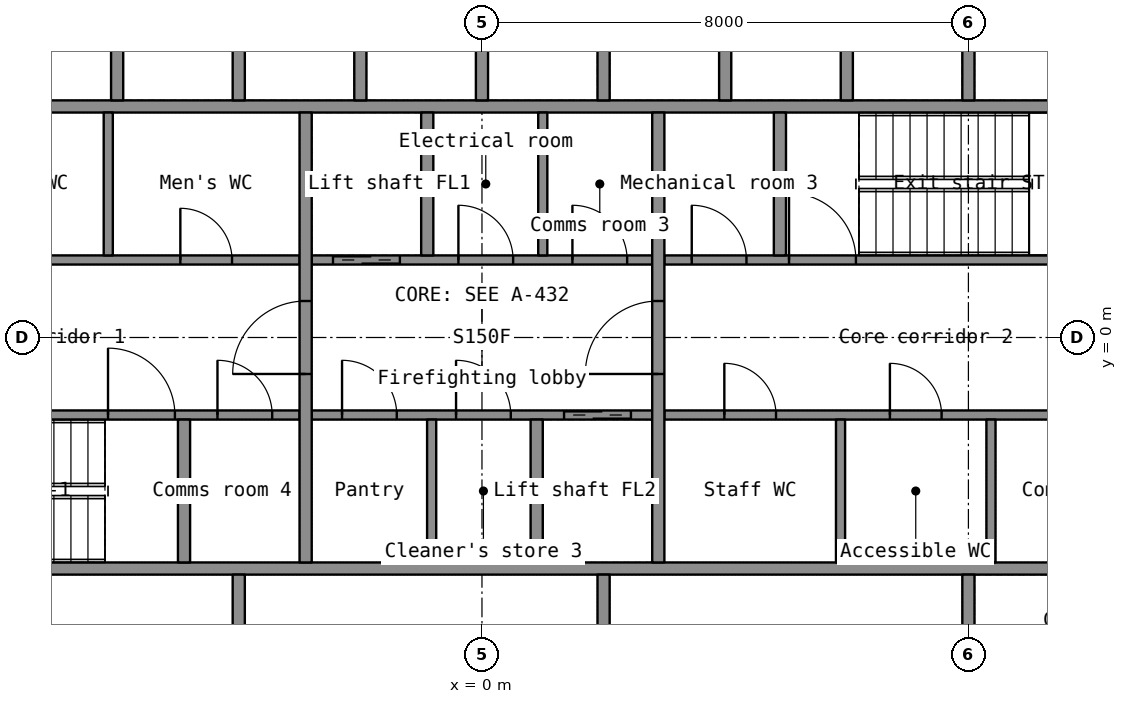
"""IFC4 building model, lengths in metres.
Left out: names, types, materials, properties, quantities, classifications, styles, units other than length and angle.
Written with IfcOpenShell. Run it as: python <this file> out.ifc"""

import sys

from ifc_helpers import new_model, si_unit, direction, frame, frame_2d, origin, place, context, subcontext, project, spatial, rectangle, extrude, element, fill, save


model = new_model("IFC4")
c1 = context("Model", 3, precision=1e-05, world=origin(), true_north=direction((0.0, 1.0)))
c2 = subcontext(c1, "Body", "Model", "MODEL_VIEW")
j1 = project(units=[si_unit("LENGTHUNIT", "METRE"), si_unit("PLANEANGLEUNIT", "RADIAN")], contexts=[c1])
p1 = place(None, origin())
s1 = spatial("IfcSite", under=j1, at=p1, CompositionType="ELEMENT")
p2 = place(p1, origin())
s2 = spatial("IfcBuilding", under=s1, at=p2, CompositionType="ELEMENT")
p3 = place(p2, frame((0.0, 0.0, 250.4)))
s3 = spatial("IfcBuildingStorey", under=s2, at=p3, CompositionType="ELEMENT", Elevation=250.4)
for number, where, z_axis, x_axis in (
    (1, (-11.6, -3.8, 0.0), (0.0, 0.0, 1.0), (1.0, 0.0, 0.0)),
    (2, (-11.6, 3.8, 0.0), (0.0, 0.0, 1.0), (1.0, 0.0, 0.0)),
):
    element("IfcWall", number, at=place(p3, frame(where, z_axis=z_axis, x_axis=x_axis)), inside=s3, PredefinedType="SHEAR", context=c2, shape_type="SweptSolid", body=[
        extrude(rectangle(XDim=23.2, YDim=0.2, at=frame_2d((11.6, 0.0))), origin(), (0.0, 0.0, 1.0), 3.3),
    ])
p4 = place(p3, frame((8.0, -6.8, 0.0), z_axis=(0.0, 0.0, 1.0), x_axis=(0.0, 1.0, 0.0)))
e3 = element("IfcWall", 3, at=p4, inside=s3, PredefinedType="SHEAR", context=c2, shape_type="SweptSolid", body=[
    extrude(rectangle(XDim=2.9, YDim=0.2, at=frame_2d((1.45, 0.0))), origin(), (0.0, 0.0, 1.0), 3.3),
])
for number, where, z_axis, x_axis in (
    (4, (-4.0, -6.8, 0.0), (0.0, 0.0, 1.0), (0.0, 1.0, 0.0)),
    (5, (2.0, -6.8, 0.0), (0.0, 0.0, 1.0), (0.0, 1.0, 0.0)),
):
    element("IfcWall", number, at=place(p3, frame(where, z_axis=z_axis, x_axis=x_axis)), inside=s3, PredefinedType="PARTITIONING", context=c2, shape_type="SweptSolid", body=[
        extrude(rectangle(XDim=2.9, YDim=0.2, at=frame_2d((1.45, 0.0))), origin(), (0.0, 0.0, 1.0), 3.3),
    ])
for number, where, z_axis, x_axis in (
    (6, (-6.0, 3.9, 0.0), (0.0, 0.0, 1.0), (0.0, 1.0, 0.0)),
    (7, (-4.0, 3.9, 0.0), (0.0, 0.0, 1.0), (0.0, 1.0, 0.0)),
    (8, (-2.0, 3.9, 0.0), (0.0, 0.0, 1.0), (0.0, 1.0, 0.0)),
    (9, (0.0, 3.9, 0.0), (0.0, 0.0, 1.0), (0.0, 1.0, 0.0)),
    (10, (2.0, 3.9, 0.0), (0.0, 0.0, 1.0), (0.0, 1.0, 0.0)),
    (11, (4.0, 3.9, 0.0), (0.0, 0.0, 1.0), (0.0, 1.0, 0.0)),
    (12, (6.0, 3.9, 0.0), (0.0, 0.0, 1.0), (0.0, 1.0, 0.0)),
    (13, (8.0, 3.9, 0.0), (0.0, 0.0, 1.0), (0.0, 1.0, 0.0)),
):
    element("IfcWall", number, at=place(p3, frame(where, z_axis=z_axis, x_axis=x_axis)), inside=s3, PredefinedType="SHEAR", context=c2, shape_type="SweptSolid", body=[
        extrude(rectangle(XDim=2.9, YDim=0.2, at=frame_2d((1.45, 0.0))), origin(), (0.0, 0.0, 1.0), 3.3),
    ])
p5 = place(p3, frame((-11.6, -1.275, 0.0), z_axis=(0.0, 0.0, 1.0), x_axis=(1.0, 0.0, 0.0)))
e14 = element("IfcWall", 14, at=p5, inside=s3, PredefinedType="SHEAR", context=c2, shape_type="SweptSolid", body=[
    extrude(rectangle(XDim=8.6, YDim=0.15, at=frame_2d((4.3, 0.0))), origin(), (0.0, 0.0, 1.0), 3.3),
])
p6 = place(p5, frame((5.45, 0.0, 0.0)))
e15 = element("IfcOpeningElement", 15, at=p6, cuts=e14, PredefinedType="OPENING", context=c2, shape_type="SweptSolid", body=[
    extrude(rectangle(XDim=1.1, YDim=2.15, at=frame_2d((0.55, 1.075))), frame((0.0, 0.085, 0.0), z_axis=(0.0, -1.0, 0.0), x_axis=(1.0, 0.0, 0.0)), (0.0, 0.0, 1.0), 0.17),
])
p7 = place(p5, frame((7.25, 0.0, 0.0)))
e16 = element("IfcOpeningElement", 16, at=p7, cuts=e14, PredefinedType="OPENING", context=c2, shape_type="SweptSolid", body=[
    extrude(rectangle(XDim=0.9, YDim=2.1, at=frame_2d((0.45, 1.05))), frame((0.0, 0.085, 0.0), z_axis=(0.0, -1.0, 0.0), x_axis=(1.0, 0.0, 0.0)), (0.0, 0.0, 1.0), 0.17),
])
p8 = place(p3, frame((-2.8, -1.275, 0.0), z_axis=(0.0, 0.0, 1.0), x_axis=(1.0, 0.0, 0.0)))
e17 = element("IfcWall", 17, at=p8, inside=s3, PredefinedType="SHEAR", context=c2, shape_type="SweptSolid", body=[
    extrude(rectangle(XDim=5.6, YDim=0.15, at=frame_2d((2.8, 0.0))), origin(), (0.0, 0.0, 1.0), 3.3),
])
p9 = place(p8, frame((4.15, 0.0, 0.0)))
e18 = element("IfcOpeningElement", 18, at=p9, cuts=e17, PredefinedType="OPENING", context=c2, shape_type="SweptSolid", body=[
    extrude(rectangle(XDim=1.1, YDim=2.2, at=frame_2d((0.55, 1.1))), frame((0.0, 0.085, 0.0), z_axis=(0.0, -1.0, 0.0), x_axis=(1.0, 0.0, 0.0)), (0.0, 0.0, 1.0), 0.17),
])
p10 = place(p8, frame((0.499, 0.0, 0.0)))
e19 = element("IfcOpeningElement", 19, at=p10, cuts=e17, PredefinedType="OPENING", context=c2, shape_type="SweptSolid", body=[
    extrude(rectangle(XDim=0.9, YDim=2.1, at=frame_2d((0.45, 1.05))), frame((0.0, 0.085, 0.0), z_axis=(0.0, -1.0, 0.0), x_axis=(1.0, 0.0, 0.0)), (0.0, 0.0, 1.0), 0.17),
])
p11 = place(p8, frame((2.374, 0.0, 0.0)))
e20 = element("IfcOpeningElement", 20, at=p11, cuts=e17, PredefinedType="OPENING", context=c2, shape_type="SweptSolid", body=[
    extrude(rectangle(XDim=0.9, YDim=2.1, at=frame_2d((0.45, 1.05))), frame((0.0, 0.085, 0.0), z_axis=(0.0, -1.0, 0.0), x_axis=(1.0, 0.0, 0.0)), (0.0, 0.0, 1.0), 0.17),
])
p12 = place(p3, frame((3.0, -1.275, 0.0), z_axis=(0.0, 0.0, 1.0), x_axis=(1.0, 0.0, 0.0)))
e21 = element("IfcWall", 21, at=p12, inside=s3, PredefinedType="PARTITIONING", context=c2, shape_type="SweptSolid", body=[
    extrude(rectangle(XDim=8.6, YDim=0.15, at=frame_2d((4.3, 0.0))), origin(), (0.0, 0.0, 1.0), 3.3),
])
p13 = place(p12, frame((0.986, 0.0, 0.0)))
e22 = element("IfcOpeningElement", 22, at=p13, cuts=e21, PredefinedType="OPENING", context=c2, shape_type="SweptSolid", body=[
    extrude(rectangle(XDim=0.85, YDim=2.1, at=frame_2d((0.425, 1.05))), frame((0.0, 0.085, 0.0), z_axis=(0.0, -1.0, 0.0), x_axis=(1.0, 0.0, 0.0)), (0.0, 0.0, 1.0), 0.17),
])
p14 = place(p12, frame((3.709, 0.0, 0.0)))
e23 = element("IfcOpeningElement", 23, at=p14, cuts=e21, PredefinedType="OPENING", context=c2, shape_type="SweptSolid", body=[
    extrude(rectangle(XDim=0.85, YDim=2.1, at=frame_2d((0.425, 1.05))), frame((0.0, 0.085, 0.0), z_axis=(0.0, -1.0, 0.0), x_axis=(1.0, 0.0, 0.0)), (0.0, 0.0, 1.0), 0.17),
])
p15 = place(p12, frame((6.573, 0.0, 0.0)))
e24 = element("IfcOpeningElement", 24, at=p15, cuts=e21, PredefinedType="OPENING", context=c2, shape_type="SweptSolid", body=[
    extrude(rectangle(XDim=0.9, YDim=2.1, at=frame_2d((0.45, 1.05))), frame((0.0, 0.085, 0.0), z_axis=(0.0, -1.0, 0.0), x_axis=(1.0, 0.0, 0.0)), (0.0, 0.0, 1.0), 0.17),
])
p16 = place(p3, frame((-11.6, 1.275, 0.0), z_axis=(0.0, 0.0, 1.0), x_axis=(1.0, 0.0, 0.0)))
e25 = element("IfcWall", 25, at=p16, inside=s3, PredefinedType="PARTITIONING", context=c2, shape_type="SweptSolid", body=[
    extrude(rectangle(XDim=8.6, YDim=0.15, at=frame_2d((4.3, 0.0))), origin(), (0.0, 0.0, 1.0), 3.3),
])
p17 = place(p16, frame((0.629, 0.0, 0.0)))
e26 = element("IfcOpeningElement", 26, at=p17, cuts=e25, PredefinedType="OPENING", context=c2, shape_type="SweptSolid", body=[
    extrude(rectangle(XDim=0.9, YDim=2.1, at=frame_2d((0.45, 1.05))), frame((0.0, 0.085, 0.0), z_axis=(0.0, -1.0, 0.0), x_axis=(1.0, 0.0, 0.0)), (0.0, 0.0, 1.0), 0.17),
])
p18 = place(p16, frame((3.418, 0.0, 0.0)))
e27 = element("IfcOpeningElement", 27, at=p18, cuts=e25, PredefinedType="OPENING", context=c2, shape_type="SweptSolid", body=[
    extrude(rectangle(XDim=0.85, YDim=2.1, at=frame_2d((0.425, 1.05))), frame((0.0, 0.085, 0.0), z_axis=(0.0, -1.0, 0.0), x_axis=(1.0, 0.0, 0.0)), (0.0, 0.0, 1.0), 0.17),
])
p19 = place(p16, frame((6.639, 0.0, 0.0)))
e28 = element("IfcOpeningElement", 28, at=p19, cuts=e25, PredefinedType="OPENING", context=c2, shape_type="SweptSolid", body=[
    extrude(rectangle(XDim=0.85, YDim=2.1, at=frame_2d((0.425, 1.05))), frame((0.0, 0.085, 0.0), z_axis=(0.0, -1.0, 0.0), x_axis=(1.0, 0.0, 0.0)), (0.0, 0.0, 1.0), 0.17),
])
p20 = place(p3, frame((-2.8, 1.275, 0.0), z_axis=(0.0, 0.0, 1.0), x_axis=(1.0, 0.0, 0.0)))
e29 = element("IfcWall", 29, at=p20, inside=s3, PredefinedType="SHEAR", context=c2, shape_type="SweptSolid", body=[
    extrude(rectangle(XDim=5.6, YDim=0.15, at=frame_2d((2.8, 0.0))), origin(), (0.0, 0.0, 1.0), 3.3),
])
p21 = place(p20, frame((0.35, 0.0, 0.0)))
e30 = element("IfcOpeningElement", 30, at=p21, cuts=e29, PredefinedType="OPENING", context=c2, shape_type="SweptSolid", body=[
    extrude(rectangle(XDim=1.1, YDim=2.2, at=frame_2d((0.55, 1.1))), frame((0.0, 0.085, 0.0), z_axis=(0.0, -1.0, 0.0), x_axis=(1.0, 0.0, 0.0)), (0.0, 0.0, 1.0), 0.17),
])
p22 = place(p20, frame((2.413, 0.0, 0.0)))
e31 = element("IfcOpeningElement", 31, at=p22, cuts=e29, PredefinedType="OPENING", context=c2, shape_type="SweptSolid", body=[
    extrude(rectangle(XDim=0.9, YDim=2.1, at=frame_2d((0.45, 1.05))), frame((0.0, 0.085, 0.0), z_axis=(0.0, -1.0, 0.0), x_axis=(1.0, 0.0, 0.0)), (0.0, 0.0, 1.0), 0.17),
])
p23 = place(p20, frame((4.288, 0.0, 0.0)))
e32 = element("IfcOpeningElement", 32, at=p23, cuts=e29, PredefinedType="OPENING", context=c2, shape_type="SweptSolid", body=[
    extrude(rectangle(XDim=0.9, YDim=2.1, at=frame_2d((0.45, 1.05))), frame((0.0, 0.085, 0.0), z_axis=(0.0, -1.0, 0.0), x_axis=(1.0, 0.0, 0.0)), (0.0, 0.0, 1.0), 0.17),
])
p24 = place(p3, frame((3.0, 1.275, 0.0), z_axis=(0.0, 0.0, 1.0), x_axis=(1.0, 0.0, 0.0)))
e33 = element("IfcWall", 33, at=p24, inside=s3, PredefinedType="SHEAR", context=c2, shape_type="SweptSolid", body=[
    extrude(rectangle(XDim=8.6, YDim=0.15, at=frame_2d((4.3, 0.0))), origin(), (0.0, 0.0, 1.0), 3.3),
])
p25 = place(p24, frame((2.05, 0.0, 0.0)))
e34 = element("IfcOpeningElement", 34, at=p25, cuts=e33, PredefinedType="OPENING", context=c2, shape_type="SweptSolid", body=[
    extrude(rectangle(XDim=1.1, YDim=2.15, at=frame_2d((0.55, 1.075))), frame((0.0, 0.085, 0.0), z_axis=(0.0, -1.0, 0.0), x_axis=(1.0, 0.0, 0.0)), (0.0, 0.0, 1.0), 0.17),
])
p26 = place(p24, frame((0.45, 0.0, 0.0)))
e35 = element("IfcOpeningElement", 35, at=p26, cuts=e33, PredefinedType="OPENING", context=c2, shape_type="SweptSolid", body=[
    extrude(rectangle(XDim=0.9, YDim=2.1, at=frame_2d((0.45, 1.05))), frame((0.0, 0.085, 0.0), z_axis=(0.0, -1.0, 0.0), x_axis=(1.0, 0.0, 0.0)), (0.0, 0.0, 1.0), 0.17),
])
p27 = place(p3, frame((-2.9, -3.7, 0.0), z_axis=(0.0, 0.0, 1.0), x_axis=(0.0, 1.0, 0.0)))
e36 = element("IfcWall", 36, at=p27, inside=s3, PredefinedType="SHEAR", context=c2, shape_type="SweptSolid", body=[
    extrude(rectangle(XDim=7.4, YDim=0.2, at=frame_2d((3.7, 0.0))), origin(), (0.0, 0.0, 1.0), 3.3),
])
p28 = place(p27, frame((3.1, 0.0, 0.0)))
e37 = element("IfcOpeningElement", 37, at=p28, cuts=e36, PredefinedType="OPENING", context=c2, shape_type="SweptSolid", body=[
    extrude(rectangle(XDim=1.2, YDim=2.2, at=frame_2d((0.6, 1.1))), frame((0.0, 0.11, 0.0), z_axis=(0.0, -1.0, 0.0), x_axis=(1.0, 0.0, 0.0)), (0.0, 0.0, 1.0), 0.22),
])
p29 = place(p3, frame((2.9, -3.7, 0.0), z_axis=(0.0, 0.0, 1.0), x_axis=(0.0, 1.0, 0.0)))
e38 = element("IfcWall", 38, at=p29, inside=s3, PredefinedType="SHEAR", context=c2, shape_type="SweptSolid", body=[
    extrude(rectangle(XDim=7.4, YDim=0.2, at=frame_2d((3.7, 0.0))), origin(), (0.0, 0.0, 1.0), 3.3),
])
p30 = place(p29, frame((3.1, 0.0, 0.0)))
e39 = element("IfcOpeningElement", 39, at=p30, cuts=e38, PredefinedType="OPENING", context=c2, shape_type="SweptSolid", body=[
    extrude(rectangle(XDim=1.2, YDim=2.2, at=frame_2d((0.6, 1.1))), frame((0.0, 0.11, 0.0), z_axis=(0.0, -1.0, 0.0), x_axis=(1.0, 0.0, 0.0)), (0.0, 0.0, 1.0), 0.22),
])
for number, where, z_axis, x_axis in (
    (40, (-0.9, 1.35, 0.0), (0.0, 0.0, 1.0), (0.0, 1.0, 0.0)),
    (41, (0.9, -3.7, 0.0), (0.0, 0.0, 1.0), (0.0, 1.0, 0.0)),
    (42, (-4.9, -3.7, 0.0), (0.0, 0.0, 1.0), (0.0, 1.0, 0.0)),
    (43, (4.9, 1.35, 0.0), (0.0, 0.0, 1.0), (0.0, 1.0, 0.0)),
):
    element("IfcWall", number, at=place(p3, frame(where, z_axis=z_axis, x_axis=x_axis)), inside=s3, PredefinedType="SHEAR", context=c2, shape_type="SweptSolid", body=[
        extrude(rectangle(XDim=2.35, YDim=0.2, at=frame_2d((1.175, 0.0))), origin(), (0.0, 0.0, 1.0), 3.3),
    ])
for number, where, z_axis, x_axis in (
    (44, (-6.146, 1.35, 0.0), (0.0, 0.0, 1.0), (0.0, 1.0, 0.0)),
    (45, (5.897, -3.7, 0.0), (0.0, 0.0, 1.0), (0.0, 1.0, 0.0)),
    (46, (8.371, -3.7, 0.0), (0.0, 0.0, 1.0), (0.0, 1.0, 0.0)),
    (47, (1.0, 1.35, 0.0), (0.0, 0.0, 1.0), (0.0, 1.0, 0.0)),
    (48, (-0.827, -3.7, 0.0), (0.0, 0.0, 1.0), (0.0, 1.0, 0.0)),
):
    element("IfcWall", number, at=place(p3, frame(where, z_axis=z_axis, x_axis=x_axis)), inside=s3, PredefinedType="PARTITIONING", context=c2, shape_type="SweptSolid", body=[
        extrude(rectangle(XDim=2.35, YDim=0.15, at=frame_2d((1.175, 0.0))), origin(), (0.0, 0.0, 1.0), 3.3),
    ])
p31 = place(p28, origin())
e49 = element("IfcDoor", 49, at=p31, inside=s3, OperationType="SINGLE_SWING_LEFT", PredefinedType="DOOR", context=c2, shape_type="SweptSolid", body=[
    extrude(rectangle(XDim=1.2, YDim=2.2, at=frame_2d((0.6, 1.1))), frame((0.0, 0.025, 0.0), z_axis=(0.0, -1.0, 0.0), x_axis=(1.0, 0.0, 0.0)), (0.0, 0.0, 1.0), 0.05),
])
fill(e37, e49)
p32 = place(p30, origin())
e50 = element("IfcDoor", 50, at=p32, inside=s3, OperationType="SINGLE_SWING_LEFT", PredefinedType="DOOR", context=c2, shape_type="SweptSolid", body=[
    extrude(rectangle(XDim=1.2, YDim=2.2, at=frame_2d((0.6, 1.1))), frame((0.0, 0.025, 0.0), z_axis=(0.0, -1.0, 0.0), x_axis=(1.0, 0.0, 0.0)), (0.0, 0.0, 1.0), 0.05),
])
fill(e39, e50)
p33 = place(p21, origin())
e51 = element("IfcDoor", 51, at=p33, inside=s3, OperationType="DOUBLE_DOOR_SLIDING", PredefinedType="DOOR", context=c2, shape_type="SweptSolid", body=[
    extrude(rectangle(XDim=1.1, YDim=2.2, at=frame_2d((0.55, 1.1))), frame((0.0, 0.025, 0.0), z_axis=(0.0, -1.0, 0.0), x_axis=(1.0, 0.0, 0.0)), (0.0, 0.0, 1.0), 0.05),
])
fill(e30, e51)
p34 = place(p9, origin())
e52 = element("IfcDoor", 52, at=p34, inside=s3, OperationType="DOUBLE_DOOR_SLIDING", PredefinedType="DOOR", context=c2, shape_type="SweptSolid", body=[
    extrude(rectangle(XDim=1.1, YDim=2.2, at=frame_2d((0.55, 1.1))), frame((0.0, 0.025, 0.0), z_axis=(0.0, -1.0, 0.0), x_axis=(1.0, 0.0, 0.0)), (0.0, 0.0, 1.0), 0.05),
])
fill(e18, e52)
p35 = place(p6, origin())
e53 = element("IfcDoor", 53, at=p35, inside=s3, OperationType="SINGLE_SWING_LEFT", PredefinedType="DOOR", context=c2, shape_type="SweptSolid", body=[
    extrude(rectangle(XDim=1.1, YDim=2.15, at=frame_2d((0.55, 1.075))), frame((0.0, 0.025, 0.0), z_axis=(0.0, -1.0, 0.0), x_axis=(1.0, 0.0, 0.0)), (0.0, 0.0, 1.0), 0.05),
])
fill(e15, e53)
p36 = place(p25, origin())
e54 = element("IfcDoor", 54, at=p36, inside=s3, OperationType="SINGLE_SWING_LEFT", PredefinedType="DOOR", context=c2, shape_type="SweptSolid", body=[
    extrude(rectangle(XDim=1.1, YDim=2.15, at=frame_2d((0.55, 1.075))), frame((0.0, 0.025, 0.0), z_axis=(0.0, -1.0, 0.0), x_axis=(1.0, 0.0, 0.0)), (0.0, 0.0, 1.0), 0.05),
])
fill(e34, e54)
p37 = place(p19, origin())
e55 = element("IfcDoor", 55, at=p37, inside=s3, OperationType="SINGLE_SWING_LEFT", PredefinedType="DOOR", context=c2, shape_type="SweptSolid", body=[
    extrude(rectangle(XDim=0.85, YDim=2.1, at=frame_2d((0.425, 1.05))), frame((0.0, 0.025, 0.0), z_axis=(0.0, -1.0, 0.0), x_axis=(1.0, 0.0, 0.0)), (0.0, 0.0, 1.0), 0.05),
])
fill(e28, e55)
p38 = place(p13, origin())
e56 = element("IfcDoor", 56, at=p38, inside=s3, OperationType="SINGLE_SWING_LEFT", PredefinedType="DOOR", context=c2, shape_type="SweptSolid", body=[
    extrude(rectangle(XDim=0.85, YDim=2.1, at=frame_2d((0.425, 1.05))), frame((0.0, 0.025, 0.0), z_axis=(0.0, -1.0, 0.0), x_axis=(1.0, 0.0, 0.0)), (0.0, 0.0, 1.0), 0.05),
])
fill(e22, e56)
p39 = place(p14, origin())
e57 = element("IfcDoor", 57, at=p39, inside=s3, OperationType="SINGLE_SWING_LEFT", PredefinedType="DOOR", context=c2, shape_type="SweptSolid", body=[
    extrude(rectangle(XDim=0.85, YDim=2.1, at=frame_2d((0.425, 1.05))), frame((0.0, 0.025, 0.0), z_axis=(0.0, -1.0, 0.0), x_axis=(1.0, 0.0, 0.0)), (0.0, 0.0, 1.0), 0.05),
])
fill(e23, e57)
p40 = place(p22, origin())
e58 = element("IfcDoor", 58, at=p40, inside=s3, OperationType="SINGLE_SWING_LEFT", PredefinedType="DOOR", context=c2, shape_type="SweptSolid", body=[
    extrude(rectangle(XDim=0.9, YDim=2.1, at=frame_2d((0.45, 1.05))), frame((0.0, 0.025, 0.0), z_axis=(0.0, -1.0, 0.0), x_axis=(1.0, 0.0, 0.0)), (0.0, 0.0, 1.0), 0.05),
])
fill(e31, e58)
p41 = place(p23, origin())
e59 = element("IfcDoor", 59, at=p41, inside=s3, OperationType="SINGLE_SWING_LEFT", PredefinedType="DOOR", context=c2, shape_type="SweptSolid", body=[
    extrude(rectangle(XDim=0.9, YDim=2.1, at=frame_2d((0.45, 1.05))), frame((0.0, 0.025, 0.0), z_axis=(0.0, -1.0, 0.0), x_axis=(1.0, 0.0, 0.0)), (0.0, 0.0, 1.0), 0.05),
])
fill(e32, e59)
p42 = place(p10, origin())
e60 = element("IfcDoor", 60, at=p42, inside=s3, OperationType="SINGLE_SWING_LEFT", PredefinedType="DOOR", context=c2, shape_type="SweptSolid", body=[
    extrude(rectangle(XDim=0.9, YDim=2.1, at=frame_2d((0.45, 1.05))), frame((0.0, 0.025, 0.0), z_axis=(0.0, -1.0, 0.0), x_axis=(1.0, 0.0, 0.0)), (0.0, 0.0, 1.0), 0.05),
])
fill(e19, e60)
p43 = place(p11, origin())
e61 = element("IfcDoor", 61, at=p43, inside=s3, OperationType="SINGLE_SWING_LEFT", PredefinedType="DOOR", context=c2, shape_type="SweptSolid", body=[
    extrude(rectangle(XDim=0.9, YDim=2.1, at=frame_2d((0.45, 1.05))), frame((0.0, 0.025, 0.0), z_axis=(0.0, -1.0, 0.0), x_axis=(1.0, 0.0, 0.0)), (0.0, 0.0, 1.0), 0.05),
])
fill(e20, e61)
p44 = place(p26, origin())
e62 = element("IfcDoor", 62, at=p44, inside=s3, OperationType="SINGLE_SWING_LEFT", PredefinedType="DOOR", context=c2, shape_type="SweptSolid", body=[
    extrude(rectangle(XDim=0.9, YDim=2.1, at=frame_2d((0.45, 1.05))), frame((0.0, 0.025, 0.0), z_axis=(0.0, -1.0, 0.0), x_axis=(1.0, 0.0, 0.0)), (0.0, 0.0, 1.0), 0.05),
])
fill(e35, e62)
p45 = place(p7, origin())
e63 = element("IfcDoor", 63, at=p45, inside=s3, OperationType="SINGLE_SWING_LEFT", PredefinedType="DOOR", context=c2, shape_type="SweptSolid", body=[
    extrude(rectangle(XDim=0.9, YDim=2.1, at=frame_2d((0.45, 1.05))), frame((0.0, 0.025, 0.0), z_axis=(0.0, -1.0, 0.0), x_axis=(1.0, 0.0, 0.0)), (0.0, 0.0, 1.0), 0.05),
])
fill(e16, e63)
save(model, sys.argv[1])
